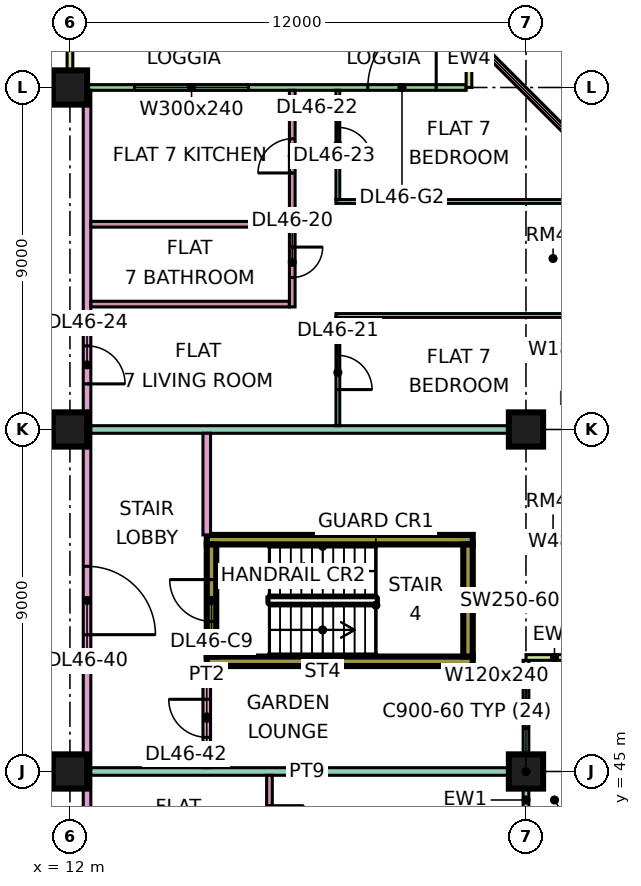
"""IFC4 building model, lengths in metres.
Left out: names, types, materials, properties, quantities, classifications, styles, units other than length and angle.
Written with IfcOpenShell. Run it as: python <this file> out.ifc"""

import sys

from ifc_helpers import new_model, si_unit, direction, frame, frame_2d, origin, origin_2d, place, context, subcontext, project, spatial, rectangle, extrude, element, fill, save


model = new_model("IFC4")
c1 = context("Model", 3, precision=1e-05, world=origin(), true_north=direction((0.0, 1.0)))
c2 = subcontext(c1, "Body", "Model", "MODEL_VIEW")
j1 = project(units=[si_unit("LENGTHUNIT", "METRE"), si_unit("PLANEANGLEUNIT", "RADIAN")], contexts=[c1])
p1 = place(None, origin())
s1 = spatial("IfcSite", under=j1, at=p1, CompositionType="ELEMENT")
p2 = place(p1, origin())
s2 = spatial("IfcBuilding", under=s1, at=p2, CompositionType="ELEMENT")
p3 = place(p2, frame((0.0, 0.0, 198.65)))
s3 = spatial("IfcBuildingStorey", under=s2, at=p3, CompositionType="ELEMENT", Elevation=198.65)
for number, where, z_axis, x_axis in (
    (1, (12.0, 45.0, 0.0), (0.0, 0.0, 1.0), (1.0, 0.0, 0.0)),
    (2, (12.0, 54.0, 0.0), (0.0, 0.0, 1.0), (1.0, 0.0, 0.0)),
    (3, (12.0, 63.0, 0.0), (0.0, 0.0, 1.0), (1.0, 0.0, 0.0)),
    (4, (24.0, 45.0, 0.0), (0.0, 0.0, 1.0), (1.0, 0.0, 0.0)),
    (5, (24.0, 54.0, 0.0), (0.0, 0.0, 1.0), (1.0, 0.0, 0.0)),
):
    element("IfcColumn", number, at=place(p3, frame(where, z_axis=z_axis, x_axis=x_axis)), inside=s3, PredefinedType="COLUMN", context=c2, shape_type="SweptSolid", body=[
        extrude(rectangle(XDim=0.9, YDim=0.9, at=origin_2d()), origin(), (0.0, 0.0, 1.0), 3.75),
    ])
for number, where, z_axis, x_axis in (
    (6, (15.6, 47.9, 0.0), (0.0, 0.0, 1.0), (1.0, 0.0, 0.0)),
    (7, (15.6, 51.1, 0.0), (0.0, 0.0, 1.0), (1.0, 0.0, 0.0)),
):
    element("IfcWall", number, at=place(p3, frame(where, z_axis=z_axis, x_axis=x_axis)), inside=s3, PredefinedType="SHEAR", context=c2, shape_type="SweptSolid", body=[
        extrude(rectangle(XDim=7.0, YDim=0.25, at=frame_2d((3.5, 0.0))), origin(), (0.0, 0.0, 1.0), 3.75),
    ])
p4 = place(p3, frame((15.725, 48.025, 0.0), z_axis=(0.0, 0.0, 1.0), x_axis=(0.0, 1.0, 0.0)))
e8 = element("IfcWall", 8, at=p4, inside=s3, PredefinedType="SHEAR", context=c2, shape_type="SweptSolid", body=[
    extrude(rectangle(XDim=2.95, YDim=0.25, at=frame_2d((1.475, 0.0))), origin(), (0.0, 0.0, 1.0), 3.75),
])
p5 = place(p4, frame((0.925, 0.0, 0.0)))
e9 = element("IfcOpeningElement", 9, at=p5, cuts=e8, PredefinedType="OPENING", context=c2, shape_type="SweptSolid", body=[
    extrude(rectangle(XDim=1.1, YDim=2.2, at=frame_2d((0.55, 1.1))), frame((0.0, 0.135, 0.0), z_axis=(0.0, -1.0, 0.0), x_axis=(1.0, 0.0, 0.0)), (0.0, 0.0, 1.0), 0.27),
])
p6 = place(p3, frame((22.475, 48.025, 0.0), z_axis=(0.0, 0.0, 1.0), x_axis=(0.0, 1.0, 0.0)))
e10 = element("IfcWall", 10, at=p6, inside=s3, PredefinedType="SHEAR", context=c2, shape_type="SweptSolid", body=[
    extrude(rectangle(XDim=2.95, YDim=0.25, at=frame_2d((1.475, 0.0))), origin(), (0.0, 0.0, 1.0), 3.75),
])
p7 = place(p3, frame((24.0, 40.575, 0.0), z_axis=(0.0, 0.0, 1.0), x_axis=(0.0, 1.0, 0.0)))
e11 = element("IfcWall", 11, at=p7, inside=s3, PredefinedType="SOLIDWALL", context=c2, shape_type="SweptSolid", body=[
    extrude(rectangle(XDim=7.35, YDim=0.15, at=frame_2d((3.675, 0.0))), origin(), (0.0, 0.0, 1.0), 3.35),
])
p8 = place(p7, frame((0.262, 0.0, 0.45)))
e12 = element("IfcOpeningElement", 12, at=p8, cuts=e11, PredefinedType="OPENING", context=c2, shape_type="SweptSolid", body=[
    extrude(rectangle(XDim=0.9, YDim=2.4, at=frame_2d((0.45, 1.2))), frame((0.0, 0.085, 0.0), z_axis=(0.0, -1.0, 0.0), x_axis=(1.0, 0.0, 0.0)), (0.0, 0.0, 1.0), 0.17),
])
p9 = place(p7, frame((2.05, 0.0, 0.0)))
e13 = element("IfcOpeningElement", 13, at=p9, cuts=e11, PredefinedType="OPENING", context=c2, shape_type="SweptSolid", body=[
    extrude(rectangle(XDim=1.2, YDim=2.4, at=frame_2d((0.6, 1.2))), frame((0.0, 0.085, 0.0), z_axis=(0.0, -1.0, 0.0), x_axis=(1.0, 0.0, 0.0)), (0.0, 0.0, 1.0), 0.17),
])
p10 = place(p7, frame((5.562, 0.0, 0.45)))
e14 = element("IfcOpeningElement", 14, at=p10, cuts=e11, PredefinedType="OPENING", context=c2, shape_type="SweptSolid", body=[
    extrude(rectangle(XDim=1.2, YDim=2.4, at=frame_2d((0.6, 1.2))), frame((0.0, 0.085, 0.0), z_axis=(0.0, -1.0, 0.0), x_axis=(1.0, 0.0, 0.0)), (0.0, 0.0, 1.0), 0.17),
])
p11 = place(p3, frame((25.5, 48.0, 0.0), z_axis=(0.0, 0.0, 1.0), x_axis=(-1.0, 0.0, 0.0)))
e15 = element("IfcWall", 15, at=p11, inside=s3, PredefinedType="SOLIDWALL", context=c2, shape_type="SweptSolid", body=[
    extrude(rectangle(XDim=1.5, YDim=0.15, at=frame_2d((0.75, 0.0))), origin(), (0.0, 0.0, 1.0), 3.35),
])
p12 = place(p3, frame((25.447, 61.447, 0.0), z_axis=(0.0, 0.0, 1.0), x_axis=(-0.707106781187, 0.707106781187, 0.0)))
e16 = element("IfcWall", 16, at=p12, inside=s3, PredefinedType="SOLIDWALL", context=c2, shape_type="SweptSolid", body=[
    extrude(rectangle(XDim=4.243, YDim=0.15, at=frame_2d((2.121, 0.0))), origin(), (0.0, 0.0, 1.0), 3.35),
])
p13 = place(p12, frame((0.498, 0.0, 0.45)))
e17 = element("IfcOpeningElement", 17, at=p13, cuts=e16, PredefinedType="OPENING", context=c2, shape_type="SweptSolid", body=[
    extrude(rectangle(XDim=3.0, YDim=2.4, at=frame_2d((1.5, 1.2))), frame((0.0, 0.085, 0.0), z_axis=(0.0, -1.0, 0.0), x_axis=(1.0, 0.0, 0.0)), (0.0, 0.0, 1.0), 0.17),
])
p14 = place(p3, frame((22.425, 63.0, 0.0), z_axis=(0.0, 0.0, 1.0), x_axis=(-1.0, 0.0, 0.0)))
e18 = element("IfcWall", 18, at=p14, inside=s3, PredefinedType="SOLIDWALL", context=c2, shape_type="SweptSolid", body=[
    extrude(rectangle(XDim=10.35, YDim=0.15, at=frame_2d((5.175, 0.0))), origin(), (0.0, 0.0, 1.0), 3.35),
])
p15 = place(p14, frame((0.788, 0.0, 0.0)))
e19 = element("IfcOpeningElement", 19, at=p15, cuts=e18, PredefinedType="OPENING", context=c2, shape_type="SweptSolid", body=[
    extrude(rectangle(XDim=1.8, YDim=2.4, at=frame_2d((0.9, 1.2))), frame((0.0, 0.085, 0.0), z_axis=(0.0, -1.0, 0.0), x_axis=(1.0, 0.0, 0.0)), (0.0, 0.0, 1.0), 0.17),
])
p16 = place(p14, frame((5.725, 0.0, 0.45)))
e20 = element("IfcOpeningElement", 20, at=p16, cuts=e18, PredefinedType="OPENING", context=c2, shape_type="SweptSolid", body=[
    extrude(rectangle(XDim=3.0, YDim=2.4, at=frame_2d((1.5, 1.2))), frame((0.0, 0.085, 0.0), z_axis=(0.0, -1.0, 0.0), x_axis=(1.0, 0.0, 0.0)), (0.0, 0.0, 1.0), 0.17),
])
for number, where, z_axis, x_axis in (
    (21, (22.5, 64.5, 0.0), (0.0, 0.0, 1.0), (0.0, -1.0, 0.0)),
    (22, (12.0, 64.5, 0.0), (0.0, 0.0, 1.0), (0.0, -1.0, 0.0)),
):
    element("IfcWall", number, at=place(p3, frame(where, z_axis=z_axis, x_axis=x_axis)), inside=s3, PredefinedType="SOLIDWALL", context=c2, shape_type="SweptSolid", body=[
        extrude(rectangle(XDim=1.5, YDim=0.15, at=frame_2d((0.75, 0.0))), origin(), (0.0, 0.0, 1.0), 3.35),
    ])
p17 = place(p3, frame((12.45, 20.0, 0.0), z_axis=(0.0, 0.0, 1.0), x_axis=(0.0, 1.0, 0.0)))
e23 = element("IfcWall", 23, at=p17, inside=s3, PredefinedType="PARTITIONING", context=c2, shape_type="SweptSolid", body=[
    extrude(rectangle(XDim=42.926, YDim=0.2, at=frame_2d((21.463, 0.0))), origin(), (0.0, 0.0, 1.0), 3.35),
])
p18 = place(p17, frame((7.15, 0.0, 0.0)))
e24 = element("IfcOpeningElement", 24, at=p18, cuts=e23, PredefinedType="OPENING", context=c2, shape_type="SweptSolid", body=[
    extrude(rectangle(XDim=1.6, YDim=2.1, at=frame_2d((0.8, 1.05))), frame((0.0, 0.11, 0.0), z_axis=(0.0, -1.0, 0.0), x_axis=(1.0, 0.0, 0.0)), (0.0, 0.0, 1.0), 0.22),
])
p19 = place(p17, frame((13.5, 0.0, 0.0)))
e25 = element("IfcOpeningElement", 25, at=p19, cuts=e23, PredefinedType="OPENING", context=c2, shape_type="SweptSolid", body=[
    extrude(rectangle(XDim=1.0, YDim=2.1, at=frame_2d((0.5, 1.05))), frame((0.0, 0.11, 0.0), z_axis=(0.0, -1.0, 0.0), x_axis=(1.0, 0.0, 0.0)), (0.0, 0.0, 1.0), 0.22),
])
p20 = place(p17, frame((17.2, 0.0, 0.0)))
e26 = element("IfcOpeningElement", 26, at=p20, cuts=e23, PredefinedType="OPENING", context=c2, shape_type="SweptSolid", body=[
    extrude(rectangle(XDim=1.0, YDim=2.1, at=frame_2d((0.5, 1.05))), frame((0.0, 0.11, 0.0), z_axis=(0.0, -1.0, 0.0), x_axis=(1.0, 0.0, 0.0)), (0.0, 0.0, 1.0), 0.22),
])
p21 = place(p17, frame((35.2, 0.0, 0.0)))
e27 = element("IfcOpeningElement", 27, at=p21, cuts=e23, PredefinedType="OPENING", context=c2, shape_type="SweptSolid", body=[
    extrude(rectangle(XDim=1.0, YDim=2.1, at=frame_2d((0.5, 1.05))), frame((0.0, 0.11, 0.0), z_axis=(0.0, -1.0, 0.0), x_axis=(1.0, 0.0, 0.0)), (0.0, 0.0, 1.0), 0.22),
])
p22 = place(p17, frame((1.15, 0.0, 0.0)))
e28 = element("IfcOpeningElement", 28, at=p22, cuts=e23, PredefinedType="OPENING", context=c2, shape_type="SweptSolid", body=[
    extrude(rectangle(XDim=1.8, YDim=2.1, at=frame_2d((0.9, 1.05))), frame((0.0, 0.11, 0.0), z_axis=(0.0, -1.0, 0.0), x_axis=(1.0, 0.0, 0.0)), (0.0, 0.0, 1.0), 0.22),
])
p23 = place(p17, frame((28.6, 0.0, 0.0)))
e29 = element("IfcOpeningElement", 29, at=p23, cuts=e23, PredefinedType="OPENING", context=c2, shape_type="SweptSolid", body=[
    extrude(rectangle(XDim=1.8, YDim=2.1, at=frame_2d((0.9, 1.05))), frame((0.0, 0.11, 0.0), z_axis=(0.0, -1.0, 0.0), x_axis=(1.0, 0.0, 0.0)), (0.0, 0.0, 1.0), 0.22),
])
p24 = place(p3, frame((12.55, 45.0, 0.0), z_axis=(0.0, 0.0, 1.0), x_axis=(1.0, 0.0, 0.0)))
e30 = element("IfcWall", 30, at=p24, inside=s3, PredefinedType="PARTITIONING", context=c2, shape_type="SweptSolid", body=[
    extrude(rectangle(XDim=11.376, YDim=0.2, at=frame_2d((5.688, 0.0))), origin(), (0.0, 0.0, 1.0), 3.35),
])
p25 = place(p3, frame((12.55, 54.0, 0.0), z_axis=(0.0, 0.0, 1.0), x_axis=(1.0, 0.0, 0.0)))
e31 = element("IfcWall", 31, at=p25, inside=s3, PredefinedType="PARTITIONING", context=c2, shape_type="SweptSolid", body=[
    extrude(rectangle(XDim=11.45, YDim=0.2, at=frame_2d((5.725, 0.0))), origin(), (0.0, 0.0, 1.0), 3.35),
])
for number, where, z_axis, x_axis in (
    (32, (12.55, 57.3, 0.0), (0.0, 0.0, 1.0), (1.0, 0.0, 0.0)),
    (33, (12.55, 59.4, 0.0), (0.0, 0.0, 1.0), (1.0, 0.0, 0.0)),
):
    element("IfcWall", number, at=place(p3, frame(where, z_axis=z_axis, x_axis=x_axis)), inside=s3, PredefinedType="PARTITIONING", context=c2, shape_type="SweptSolid", body=[
        extrude(rectangle(XDim=5.225, YDim=0.15, at=frame_2d((2.612, 0.0))), origin(), (0.0, 0.0, 1.0), 3.35),
    ])
p26 = place(p3, frame((15.6, 45.1, 0.0), z_axis=(0.0, 0.0, 1.0), x_axis=(0.0, 1.0, 0.0)))
e34 = element("IfcWall", 34, at=p26, inside=s3, PredefinedType="PARTITIONING", context=c2, shape_type="SweptSolid", body=[
    extrude(rectangle(XDim=2.675, YDim=0.2, at=frame_2d((1.337, 0.0))), origin(), (0.0, 0.0, 1.0), 3.35),
])
p27 = place(p26, frame((0.8, 0.0, 0.0)))
e35 = element("IfcOpeningElement", 35, at=p27, cuts=e34, PredefinedType="OPENING", context=c2, shape_type="SweptSolid", body=[
    extrude(rectangle(XDim=1.0, YDim=2.1, at=frame_2d((0.5, 1.05))), frame((0.0, 0.11, 0.0), z_axis=(0.0, -1.0, 0.0), x_axis=(1.0, 0.0, 0.0)), (0.0, 0.0, 1.0), 0.22),
])
p28 = place(p3, frame((15.6, 51.225, 0.0), z_axis=(0.0, 0.0, 1.0), x_axis=(0.0, 1.0, 0.0)))
e36 = element("IfcWall", 36, at=p28, inside=s3, PredefinedType="PARTITIONING", context=c2, shape_type="SweptSolid", body=[
    extrude(rectangle(XDim=2.675, YDim=0.2, at=frame_2d((1.337, 0.0))), origin(), (0.0, 0.0, 1.0), 3.35),
])
p29 = place(p3, frame((17.25, 39.225, 0.0), z_axis=(0.0, 0.0, 1.0), x_axis=(0.0, 1.0, 0.0)))
e37 = element("IfcWall", 37, at=p29, inside=s3, PredefinedType="PARTITIONING", context=c2, shape_type="SweptSolid", body=[
    extrude(rectangle(XDim=5.675, YDim=0.15, at=frame_2d((2.837, 0.0))), origin(), (0.0, 0.0, 1.0), 3.35),
])
p30 = place(p29, frame((1.225, 0.0, 0.0)))
e38 = element("IfcOpeningElement", 38, at=p30, cuts=e37, PredefinedType="OPENING", context=c2, shape_type="SweptSolid", body=[
    extrude(rectangle(XDim=0.8, YDim=2.1, at=frame_2d((0.4, 1.05))), frame((0.0, 0.085, 0.0), z_axis=(0.0, -1.0, 0.0), x_axis=(1.0, 0.0, 0.0)), (0.0, 0.0, 1.0), 0.17),
])
p31 = place(p29, frame((3.975, 0.0, 0.0)))
e39 = element("IfcOpeningElement", 39, at=p31, cuts=e37, PredefinedType="OPENING", context=c2, shape_type="SweptSolid", body=[
    extrude(rectangle(XDim=0.9, YDim=2.1, at=frame_2d((0.45, 1.05))), frame((0.0, 0.085, 0.0), z_axis=(0.0, -1.0, 0.0), x_axis=(1.0, 0.0, 0.0)), (0.0, 0.0, 1.0), 0.17),
])
p32 = place(p3, frame((17.85, 57.225, 0.0), z_axis=(0.0, 0.0, 1.0), x_axis=(0.0, 1.0, 0.0)))
e40 = element("IfcWall", 40, at=p32, inside=s3, PredefinedType="PARTITIONING", context=c2, shape_type="SweptSolid", body=[
    extrude(rectangle(XDim=5.701, YDim=0.15, at=frame_2d((2.851, 0.0))), origin(), (0.0, 0.0, 1.0), 3.35),
])
p33 = place(p32, frame((0.775, 0.0, 0.0)))
e41 = element("IfcOpeningElement", 41, at=p33, cuts=e40, PredefinedType="OPENING", context=c2, shape_type="SweptSolid", body=[
    extrude(rectangle(XDim=0.8, YDim=2.1, at=frame_2d((0.4, 1.05))), frame((0.0, 0.085, 0.0), z_axis=(0.0, -1.0, 0.0), x_axis=(1.0, 0.0, 0.0)), (0.0, 0.0, 1.0), 0.17),
])
p34 = place(p32, frame((3.525, 0.0, 0.0)))
e42 = element("IfcOpeningElement", 42, at=p34, cuts=e40, PredefinedType="OPENING", context=c2, shape_type="SweptSolid", body=[
    extrude(rectangle(XDim=0.9, YDim=2.1, at=frame_2d((0.45, 1.05))), frame((0.0, 0.085, 0.0), z_axis=(0.0, -1.0, 0.0), x_axis=(1.0, 0.0, 0.0)), (0.0, 0.0, 1.0), 0.17),
])
for number, where, z_axis, x_axis in (
    (43, (19.0, 57.0, 0.0), (0.0, 0.0, 1.0), (1.0, 0.0, 0.0)),
    (44, (19.0, 60.0, 0.0), (0.0, 0.0, 1.0), (1.0, 0.0, 0.0)),
):
    element("IfcWall", number, at=place(p3, frame(where, z_axis=z_axis, x_axis=x_axis)), inside=s3, PredefinedType="PARTITIONING", context=c2, shape_type="SweptSolid", body=[
        extrude(rectangle(XDim=6.35, YDim=0.1, at=frame_2d((3.175, 0.0))), origin(), (0.0, 0.0, 1.0), 3.35),
    ])
p35 = place(p3, frame((19.05, 54.1, 0.0), z_axis=(0.0, 0.0, 1.0), x_axis=(0.0, 1.0, 0.0)))
e45 = element("IfcWall", 45, at=p35, inside=s3, PredefinedType="PARTITIONING", context=c2, shape_type="SweptSolid", body=[
    extrude(rectangle(XDim=2.85, YDim=0.1, at=frame_2d((1.425, 0.0))), origin(), (0.0, 0.0, 1.0), 3.35),
])
p36 = place(p35, frame((0.95, 0.0, 0.0)))
e46 = element("IfcOpeningElement", 46, at=p36, cuts=e45, PredefinedType="OPENING", context=c2, shape_type="SweptSolid", body=[
    extrude(rectangle(XDim=0.9, YDim=2.1, at=frame_2d((0.45, 1.05))), frame((0.0, 0.06, 0.0), z_axis=(0.0, -1.0, 0.0), x_axis=(1.0, 0.0, 0.0)), (0.0, 0.0, 1.0), 0.12),
])
p37 = place(p3, frame((19.05, 60.05, 0.0), z_axis=(0.0, 0.0, 1.0), x_axis=(0.0, 1.0, 0.0)))
e47 = element("IfcWall", 47, at=p37, inside=s3, PredefinedType="PARTITIONING", context=c2, shape_type="SweptSolid", body=[
    extrude(rectangle(XDim=2.876, YDim=0.1, at=frame_2d((1.438, 0.0))), origin(), (0.0, 0.0, 1.0), 3.35),
])
p38 = place(p37, frame((1.0, 0.0, 0.0)))
e48 = element("IfcOpeningElement", 48, at=p38, cuts=e47, PredefinedType="OPENING", context=c2, shape_type="SweptSolid", body=[
    extrude(rectangle(XDim=0.9, YDim=2.1, at=frame_2d((0.45, 1.05))), frame((0.0, 0.06, 0.0), z_axis=(0.0, -1.0, 0.0), x_axis=(1.0, 0.0, 0.0)), (0.0, 0.0, 1.0), 0.12),
])
p39 = place(p10, origin())
e49 = element("IfcWindow", 49, at=p39, inside=s3, PartitioningType="SINGLE_PANEL", PredefinedType="WINDOW", context=c2, shape_type="SweptSolid", body=[
    extrude(rectangle(XDim=1.2, YDim=2.4, at=frame_2d((0.6, 1.2))), frame((0.0, 0.03, 0.0), z_axis=(0.0, -1.0, 0.0), x_axis=(1.0, 0.0, 0.0)), (0.0, 0.0, 1.0), 0.06),
])
fill(e14, e49)
p40 = place(p13, origin())
e50 = element("IfcWindow", 50, at=p40, inside=s3, PartitioningType="SINGLE_PANEL", PredefinedType="WINDOW", context=c2, shape_type="SweptSolid", body=[
    extrude(rectangle(XDim=3.0, YDim=2.4, at=frame_2d((1.5, 1.2))), frame((0.0, 0.03, 0.0), z_axis=(0.0, -1.0, 0.0), x_axis=(1.0, 0.0, 0.0)), (0.0, 0.0, 1.0), 0.06),
])
fill(e17, e50)
p41 = place(p15, frame((1.8, 0.0, 0.0), z_axis=(0.0, 0.0, 1.0), x_axis=(-1.0, 0.0, 0.0)))
e51 = element("IfcDoor", 51, at=p41, inside=s3, OperationType="DOUBLE_DOOR_SINGLE_SWING", PredefinedType="DOOR", context=c2, shape_type="SweptSolid", body=[
    extrude(rectangle(XDim=1.8, YDim=2.4, at=frame_2d((0.9, 1.2))), frame((0.0, 0.025, 0.0), z_axis=(0.0, -1.0, 0.0), x_axis=(1.0, 0.0, 0.0)), (0.0, 0.0, 1.0), 0.05),
])
fill(e19, e51)
p42 = place(p16, origin())
e52 = element("IfcWindow", 52, at=p42, inside=s3, PartitioningType="SINGLE_PANEL", PredefinedType="WINDOW", context=c2, shape_type="SweptSolid", body=[
    extrude(rectangle(XDim=3.0, YDim=2.4, at=frame_2d((1.5, 1.2))), frame((0.0, 0.03, 0.0), z_axis=(0.0, -1.0, 0.0), x_axis=(1.0, 0.0, 0.0)), (0.0, 0.0, 1.0), 0.06),
])
fill(e20, e52)
p43 = place(p5, frame((1.1, 0.0, 0.0), z_axis=(0.0, 0.0, 1.0), x_axis=(-1.0, 0.0, 0.0)))
e53 = element("IfcDoor", 53, at=p43, inside=s3, OperationType="SINGLE_SWING_RIGHT", PredefinedType="DOOR", context=c2, shape_type="SweptSolid", body=[
    extrude(rectangle(XDim=1.1, YDim=2.2, at=frame_2d((0.55, 1.1))), frame((0.0, 0.025, 0.0), z_axis=(0.0, -1.0, 0.0), x_axis=(1.0, 0.0, 0.0)), (0.0, 0.0, 1.0), 0.05),
])
fill(e9, e53)
p44 = place(p31, origin())
e54 = element("IfcDoor", 54, at=p44, inside=s3, OperationType="SINGLE_SWING_RIGHT", PredefinedType="DOOR", context=c2, shape_type="SweptSolid", body=[
    extrude(rectangle(XDim=0.9, YDim=2.1, at=frame_2d((0.45, 1.05))), frame((0.0, 0.025, 0.0), z_axis=(0.0, -1.0, 0.0), x_axis=(1.0, 0.0, 0.0)), (0.0, 0.0, 1.0), 0.05),
])
fill(e39, e54)
p45 = place(p33, origin())
e55 = element("IfcDoor", 55, at=p45, inside=s3, OperationType="SINGLE_SWING_RIGHT", PredefinedType="DOOR", context=c2, shape_type="SweptSolid", body=[
    extrude(rectangle(XDim=0.8, YDim=2.1, at=frame_2d((0.4, 1.05))), frame((0.0, 0.025, 0.0), z_axis=(0.0, -1.0, 0.0), x_axis=(1.0, 0.0, 0.0)), (0.0, 0.0, 1.0), 0.05),
])
fill(e41, e55)
p46 = place(p36, frame((0.9, 0.0, 0.0), z_axis=(0.0, 0.0, 1.0), x_axis=(-1.0, 0.0, 0.0)))
e56 = element("IfcDoor", 56, at=p46, inside=s3, OperationType="SINGLE_SWING_LEFT", PredefinedType="DOOR", context=c2, shape_type="SweptSolid", body=[
    extrude(rectangle(XDim=0.9, YDim=2.1, at=frame_2d((0.45, 1.05))), frame((0.0, 0.025, 0.0), z_axis=(0.0, -1.0, 0.0), x_axis=(1.0, 0.0, 0.0)), (0.0, 0.0, 1.0), 0.05),
])
fill(e46, e56)
p47 = place(p38, frame((0.9, 0.0, 0.0), z_axis=(0.0, 0.0, 1.0), x_axis=(-1.0, 0.0, 0.0)))
e57 = element("IfcDoor", 57, at=p47, inside=s3, OperationType="SINGLE_SWING_LEFT", PredefinedType="DOOR", context=c2, shape_type="SweptSolid", body=[
    extrude(rectangle(XDim=0.9, YDim=2.1, at=frame_2d((0.45, 1.05))), frame((0.0, 0.025, 0.0), z_axis=(0.0, -1.0, 0.0), x_axis=(1.0, 0.0, 0.0)), (0.0, 0.0, 1.0), 0.05),
])
fill(e48, e57)
p48 = place(p34, origin())
e58 = element("IfcDoor", 58, at=p48, inside=s3, OperationType="SINGLE_SWING_LEFT", PredefinedType="DOOR", context=c2, shape_type="SweptSolid", body=[
    extrude(rectangle(XDim=0.9, YDim=2.1, at=frame_2d((0.45, 1.05))), frame((0.0, 0.025, 0.0), z_axis=(0.0, -1.0, 0.0), x_axis=(1.0, 0.0, 0.0)), (0.0, 0.0, 1.0), 0.05),
])
fill(e42, e58)
p49 = place(p21, frame((1.0, 0.0, 0.0), z_axis=(0.0, 0.0, 1.0), x_axis=(-1.0, 0.0, 0.0)))
e59 = element("IfcDoor", 59, at=p49, inside=s3, OperationType="SINGLE_SWING_LEFT", PredefinedType="DOOR", context=c2, shape_type="SweptSolid", body=[
    extrude(rectangle(XDim=1.0, YDim=2.1, at=frame_2d((0.5, 1.05))), frame((0.0, 0.025, 0.0), z_axis=(0.0, -1.0, 0.0), x_axis=(1.0, 0.0, 0.0)), (0.0, 0.0, 1.0), 0.05),
])
fill(e27, e59)
p50 = place(p23, frame((1.8, 0.0, 0.0), z_axis=(0.0, 0.0, 1.0), x_axis=(-1.0, 0.0, 0.0)))
e60 = element("IfcDoor", 60, at=p50, inside=s3, OperationType="DOUBLE_DOOR_SINGLE_SWING", PredefinedType="DOOR", context=c2, shape_type="SweptSolid", body=[
    extrude(rectangle(XDim=1.8, YDim=2.1, at=frame_2d((0.9, 1.05))), frame((0.0, 0.025, 0.0), z_axis=(0.0, -1.0, 0.0), x_axis=(1.0, 0.0, 0.0)), (0.0, 0.0, 1.0), 0.05),
])
fill(e29, e60)
p51 = place(p27, frame((1.0, 0.0, 0.0), z_axis=(0.0, 0.0, 1.0), x_axis=(-1.0, 0.0, 0.0)))
e61 = element("IfcDoor", 61, at=p51, inside=s3, OperationType="SINGLE_SWING_RIGHT", PredefinedType="DOOR", context=c2, shape_type="SweptSolid", body=[
    extrude(rectangle(XDim=1.0, YDim=2.1, at=frame_2d((0.5, 1.05))), frame((0.0, 0.025, 0.0), z_axis=(0.0, -1.0, 0.0), x_axis=(1.0, 0.0, 0.0)), (0.0, 0.0, 1.0), 0.05),
])
fill(e35, e61)
save(model, sys.argv[1])
